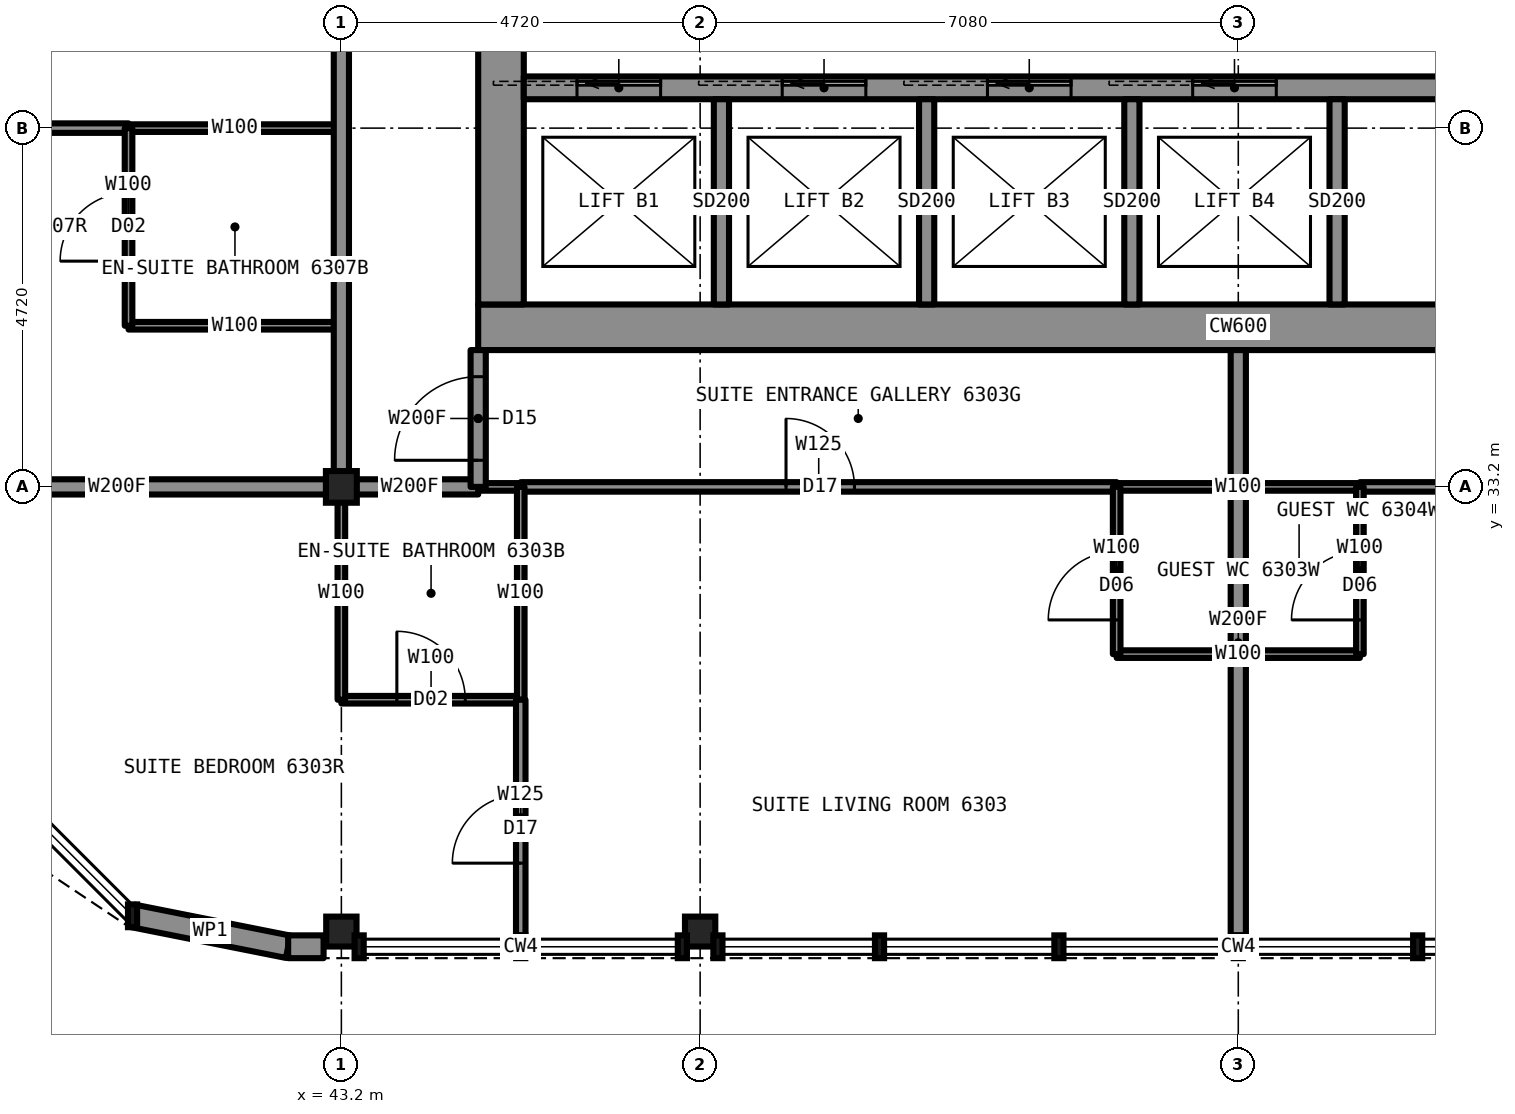
"""IFC4 building model, lengths in metres.
Left out: names, types, materials, properties, quantities, classifications, styles, units other than length and angle.
Written with IfcOpenShell. Run it as: python <this file> out.ifc"""

import sys

from ifc_helpers import new_model, si_unit, direction, frame, frame_2d, origin, origin_2d, place, context, subcontext, project, spatial, rectangle, i_section, extrude, element, fill, save


model = new_model("IFC4")
c1 = context("Model", 3, precision=1e-05, world=origin(), true_north=direction((0.0, 1.0)))
c2 = subcontext(c1, "Body", "Model", "MODEL_VIEW")
j1 = project(units=[si_unit("LENGTHUNIT", "METRE"), si_unit("PLANEANGLEUNIT", "RADIAN")], contexts=[c1])
p1 = place(None, origin())
s1 = spatial("IfcSite", under=j1, at=p1, CompositionType="ELEMENT")
p2 = place(p1, origin())
s2 = spatial("IfcBuilding", under=s1, at=p2, CompositionType="ELEMENT")
p3 = place(p2, frame((0.0, 0.0, 226.7)))
s3 = spatial("IfcBuildingStorey", under=s2, at=p3, CompositionType="ELEMENT", Elevation=226.7)
for number, where, z_axis, x_axis in (
    (1, (43.2, 27.35, 0.0), (0.0, 0.0, 1.0), (1.0, 0.0, 0.0)),
    (2, (47.92, 27.35, 0.0), (0.0, 0.0, 1.0), (1.0, 0.0, 0.0)),
):
    element("IfcColumn", number, at=place(p3, frame(where, z_axis=z_axis, x_axis=x_axis)), inside=s3, PredefinedType="COLUMN", context=c2, shape_type="SweptSolid", body=[
        extrude(i_section(OverallWidth=0.442, OverallDepth=0.531, WebThickness=0.066, FlangeThickness=0.106, at=origin_2d()), origin(), (0.0, 0.0, 1.0), 3.5),
    ])
p4 = place(p3, frame((43.2, 33.2, 0.0), z_axis=(0.0, 0.0, 1.0), x_axis=(1.0, 0.0, 0.0)))
e3 = element("IfcColumn", 3, at=p4, inside=s3, PredefinedType="COLUMN", context=c2, shape_type="SweptSolid", body=[
    extrude(i_section(OverallWidth=0.406, OverallDepth=0.417, WebThickness=0.03, FlangeThickness=0.048, at=origin_2d()), origin(), (0.0, 0.0, 1.0), 3.5),
])
p5 = place(p3, frame((45.0, 35.3, 0.0), z_axis=(0.0, 0.0, 1.0), x_axis=(1.0, 0.0, 0.0)))
e4 = element("IfcWall", 4, at=p5, inside=s3, PredefinedType="SHEAR", context=c2, shape_type="SweptSolid", body=[
    extrude(rectangle(XDim=20.0, YDim=0.6, at=frame_2d((10.0, 0.0))), origin(), (0.0, 0.0, 1.0), 3.5),
])
p6 = place(p3, frame((45.3, 35.6, 0.0), z_axis=(0.0, 0.0, 1.0), x_axis=(0.0, 1.0, 0.0)))
e5 = element("IfcWall", 5, at=p6, inside=s3, PredefinedType="SHEAR", context=c2, shape_type="SweptSolid", body=[
    extrude(rectangle(XDim=18.8, YDim=0.6, at=frame_2d((9.4, 0.0))), origin(), (0.0, 0.0, 1.0), 3.5),
])
p7 = place(p6, frame((13.4, 0.0, 0.0)))
e6 = element("IfcOpeningElement", 6, at=p7, cuts=e5, PredefinedType="OPENING", context=c2, shape_type="SweptSolid", body=[
    extrude(rectangle(XDim=1.8, YDim=2.2, at=frame_2d((0.9, 1.1))), frame((0.0, 0.31, 0.0), z_axis=(0.0, -1.0, 0.0), x_axis=(1.0, 0.0, 0.0)), (0.0, 0.0, 1.0), 0.62),
])
p8 = place(p6, frame((3.6, 0.0, 0.0)))
e7 = element("IfcOpeningElement", 7, at=p8, cuts=e5, PredefinedType="OPENING", context=c2, shape_type="SweptSolid", body=[
    extrude(rectangle(XDim=1.8, YDim=2.2, at=frame_2d((0.9, 1.1))), frame((0.0, 0.31, 0.0), z_axis=(0.0, -1.0, 0.0), x_axis=(1.0, 0.0, 0.0)), (0.0, 0.0, 1.0), 0.62),
])
p9 = place(p6, frame((6.4, 0.0, 0.0)))
e8 = element("IfcOpeningElement", 8, at=p9, cuts=e5, PredefinedType="OPENING", context=c2, shape_type="SweptSolid", body=[
    extrude(rectangle(XDim=1.2, YDim=2.2, at=frame_2d((0.6, 1.1))), frame((0.0, 0.31, 0.0), z_axis=(0.0, -1.0, 0.0), x_axis=(1.0, 0.0, 0.0)), (0.0, 0.0, 1.0), 0.62),
])
p10 = place(p3, frame((45.6, 38.45, 0.0), z_axis=(0.0, 0.0, 1.0), x_axis=(1.0, 0.0, 0.0)))
e9 = element("IfcWall", 9, at=p10, inside=s3, PredefinedType="SHEAR", context=c2, shape_type="SweptSolid", body=[
    extrude(rectangle(XDim=18.8, YDim=0.3, at=frame_2d((9.4, 0.0))), origin(), (0.0, 0.0, 1.0), 3.5),
])
p11 = place(p10, frame((0.7, 0.0, 0.0)))
e10 = element("IfcOpeningElement", 10, at=p11, cuts=e9, PredefinedType="OPENING", context=c2, shape_type="SweptSolid", body=[
    extrude(rectangle(XDim=1.1, YDim=2.2, at=frame_2d((0.55, 1.1))), frame((0.0, 0.16, 0.0), z_axis=(0.0, -1.0, 0.0), x_axis=(1.0, 0.0, 0.0)), (0.0, 0.0, 1.0), 0.32),
])
p12 = place(p10, frame((3.4, 0.0, 0.0)))
e11 = element("IfcOpeningElement", 11, at=p12, cuts=e9, PredefinedType="OPENING", context=c2, shape_type="SweptSolid", body=[
    extrude(rectangle(XDim=1.1, YDim=2.2, at=frame_2d((0.55, 1.1))), frame((0.0, 0.16, 0.0), z_axis=(0.0, -1.0, 0.0), x_axis=(1.0, 0.0, 0.0)), (0.0, 0.0, 1.0), 0.32),
])
p13 = place(p10, frame((6.1, 0.0, 0.0)))
e12 = element("IfcOpeningElement", 12, at=p13, cuts=e9, PredefinedType="OPENING", context=c2, shape_type="SweptSolid", body=[
    extrude(rectangle(XDim=1.1, YDim=2.2, at=frame_2d((0.55, 1.1))), frame((0.0, 0.16, 0.0), z_axis=(0.0, -1.0, 0.0), x_axis=(1.0, 0.0, 0.0)), (0.0, 0.0, 1.0), 0.32),
])
p14 = place(p10, frame((8.8, 0.0, 0.0)))
e13 = element("IfcOpeningElement", 13, at=p14, cuts=e9, PredefinedType="OPENING", context=c2, shape_type="SweptSolid", body=[
    extrude(rectangle(XDim=1.1, YDim=2.2, at=frame_2d((0.55, 1.1))), frame((0.0, 0.16, 0.0), z_axis=(0.0, -1.0, 0.0), x_axis=(1.0, 0.0, 0.0)), (0.0, 0.0, 1.0), 0.32),
])
p15 = place(p3, frame((45.0, 33.2, 0.0), z_axis=(0.0, 0.0, 1.0), x_axis=(1.0, 0.0, 0.0)))
e14 = element("IfcWall", 14, at=p15, inside=s3, PredefinedType="PARTITIONING", context=c2, shape_type="SweptSolid", body=[
    extrude(rectangle(XDim=0.56, YDim=0.1, at=frame_2d((0.28, 0.0))), origin(), (0.0, 0.0, 1.0), 3.33),
])
p16 = place(p3, frame((53.4, 33.2, 0.0), z_axis=(0.0, 0.0, 1.0), x_axis=(1.0, 0.0, 0.0)))
e15 = element("IfcWall", 15, at=p16, inside=s3, PredefinedType="PARTITIONING", context=c2, shape_type="SweptSolid", body=[
    extrude(rectangle(XDim=3.2, YDim=0.1, at=frame_2d((1.6, 0.0))), origin(), (0.0, 0.0, 1.0), 3.33),
])
p17 = place(p3, frame((43.2, 33.2, 0.0), z_axis=(0.0, 0.0, 1.0), x_axis=(1.0, 0.0, 0.0)))
e16 = element("IfcWall", 16, at=p17, inside=s3, PredefinedType="PARTITIONING", context=c2, shape_type="SweptSolid", body=[
    extrude(rectangle(XDim=1.8, YDim=0.2, at=frame_2d((0.9, 0.0))), origin(), (0.0, 0.0, 1.0), 3.33),
])
p18 = place(p3, frame((37.3, 33.2, 0.0), z_axis=(0.0, 0.0, 1.0), x_axis=(1.0, 0.0, 0.0)))
e17 = element("IfcWall", 17, at=p18, inside=s3, PredefinedType="PARTITIONING", context=c2, shape_type="SweptSolid", body=[
    extrude(rectangle(XDim=5.9, YDim=0.2, at=frame_2d((2.95, 0.0))), origin(), (0.0, 0.0, 1.0), 2.573),
])
p19 = place(p3, frame((45.56, 33.2, 0.0), z_axis=(0.0, 0.0, 1.0), x_axis=(1.0, 0.0, 0.0)))
e18 = element("IfcWall", 18, at=p19, inside=s3, PredefinedType="PARTITIONING", context=c2, shape_type="SweptSolid", body=[
    extrude(rectangle(XDim=7.84, YDim=0.125, at=frame_2d((3.92, 0.0))), origin(), (0.0, 0.0, 1.0), 3.33),
])
p20 = place(p19, frame((3.49, 0.0, 0.0)))
e19 = element("IfcOpeningElement", 19, at=p20, cuts=e18, PredefinedType="OPENING", context=c2, shape_type="SweptSolid", body=[
    extrude(rectangle(XDim=0.9, YDim=2.2, at=frame_2d((0.45, 1.1))), frame((0.0, 0.073, 0.0), z_axis=(0.0, -1.0, 0.0), x_axis=(1.0, 0.0, 0.0)), (0.0, 0.0, 1.0), 0.145),
])
p21 = place(p3, frame((56.6, 33.2, 0.0), z_axis=(0.0, 0.0, 1.0), x_axis=(1.0, 0.0, 0.0)))
e20 = element("IfcWall", 20, at=p21, inside=s3, PredefinedType="PARTITIONING", context=c2, shape_type="SweptSolid", body=[
    extrude(rectangle(XDim=7.84, YDim=0.125, at=frame_2d((3.92, 0.0))), origin(), (0.0, 0.0, 1.0), 3.33),
])
p22 = place(p21, frame((3.45, 0.0, 0.0)))
e21 = element("IfcOpeningElement", 21, at=p22, cuts=e20, PredefinedType="OPENING", context=c2, shape_type="SweptSolid", body=[
    extrude(rectangle(XDim=0.9, YDim=2.2, at=frame_2d((0.45, 1.1))), frame((0.0, 0.073, 0.0), z_axis=(0.0, -1.0, 0.0), x_axis=(1.0, 0.0, 0.0)), (0.0, 0.0, 1.0), 0.145),
])
p23 = place(p3, frame((53.4, 31.0, 0.0), z_axis=(0.0, 0.0, 1.0), x_axis=(1.0, 0.0, 0.0)))
e22 = element("IfcWall", 22, at=p23, inside=s3, PredefinedType="PARTITIONING", context=c2, shape_type="SweptSolid", body=[
    extrude(rectangle(XDim=3.2, YDim=0.1, at=frame_2d((1.6, 0.0))), origin(), (0.0, 0.0, 1.0), 3.33),
])
p24 = place(p3, frame((43.2, 30.4, 0.0), z_axis=(0.0, 0.0, 1.0), x_axis=(1.0, 0.0, 0.0)))
e23 = element("IfcWall", 23, at=p24, inside=s3, PredefinedType="PARTITIONING", context=c2, shape_type="SweptSolid", body=[
    extrude(rectangle(XDim=2.36, YDim=0.1, at=frame_2d((1.18, 0.0))), origin(), (0.0, 0.0, 1.0), 3.33),
])
p25 = place(p24, frame((0.73, 0.0, 0.0)))
e24 = element("IfcOpeningElement", 24, at=p25, cuts=e23, PredefinedType="OPENING", context=c2, shape_type="SweptSolid", body=[
    extrude(rectangle(XDim=0.9, YDim=2.1, at=frame_2d((0.45, 1.05))), frame((0.0, 0.06, 0.0), z_axis=(0.0, -1.0, 0.0), x_axis=(1.0, 0.0, 0.0)), (0.0, 0.0, 1.0), 0.12),
])
p26 = place(p3, frame((40.4, 37.92, 0.0), z_axis=(0.0, 0.0, 1.0), x_axis=(1.0, 0.0, 0.0)))
e25 = element("IfcWall", 25, at=p26, inside=s3, PredefinedType="PARTITIONING", context=c2, shape_type="SweptSolid", body=[
    extrude(rectangle(XDim=2.8, YDim=0.1, at=frame_2d((1.4, 0.0))), origin(), (0.0, 0.0, 1.0), 2.573),
])
p27 = place(p3, frame((37.3, 37.92, 0.0), z_axis=(0.0, 0.0, 1.0), x_axis=(1.0, 0.0, 0.0)))
e26 = element("IfcWall", 26, at=p27, inside=s3, PredefinedType="PARTITIONING", context=c2, shape_type="SweptSolid", body=[
    extrude(rectangle(XDim=3.1, YDim=0.125, at=frame_2d((1.55, 0.0))), origin(), (0.0, 0.0, 1.0), 2.573),
])
p28 = place(p27, frame((0.95, 0.0, 0.0)))
e27 = element("IfcOpeningElement", 27, at=p28, cuts=e26, PredefinedType="OPENING", context=c2, shape_type="SweptSolid", body=[
    extrude(rectangle(XDim=0.9, YDim=2.2, at=frame_2d((0.45, 1.1))), frame((0.0, 0.073, 0.0), z_axis=(0.0, -1.0, 0.0), x_axis=(1.0, 0.0, 0.0)), (0.0, 0.0, 1.0), 0.145),
])
p29 = place(p3, frame((40.4, 35.32, 0.0), z_axis=(0.0, 0.0, 1.0), x_axis=(1.0, 0.0, 0.0)))
e28 = element("IfcWall", 28, at=p29, inside=s3, PredefinedType="PARTITIONING", context=c2, shape_type="SweptSolid", body=[
    extrude(rectangle(XDim=2.8, YDim=0.1, at=frame_2d((1.4, 0.0))), origin(), (0.0, 0.0, 1.0), 3.33),
])
p30 = place(p3, frame((53.4, 31.0, 0.0), z_axis=(0.0, 0.0, 1.0), x_axis=(0.0, 1.0, 0.0)))
e29 = element("IfcWall", 29, at=p30, inside=s3, PredefinedType="PARTITIONING", context=c2, shape_type="SweptSolid", body=[
    extrude(rectangle(XDim=2.2, YDim=0.1, at=frame_2d((1.1, 0.0))), origin(), (0.0, 0.0, 1.0), 3.33),
])
p31 = place(p30, frame((0.45, 0.0, 0.0)))
e30 = element("IfcOpeningElement", 30, at=p31, cuts=e29, PredefinedType="OPENING", context=c2, shape_type="SweptSolid", body=[
    extrude(rectangle(XDim=0.9, YDim=2.1, at=frame_2d((0.45, 1.05))), frame((0.0, 0.06, 0.0), z_axis=(0.0, -1.0, 0.0), x_axis=(1.0, 0.0, 0.0)), (0.0, 0.0, 1.0), 0.12),
])
p32 = place(p3, frame((45.0, 33.2, 0.0), z_axis=(0.0, 0.0, 1.0), x_axis=(0.0, 1.0, 0.0)))
e31 = element("IfcWall", 31, at=p32, inside=s3, PredefinedType="PARTITIONING", context=c2, shape_type="SweptSolid", body=[
    extrude(rectangle(XDim=1.8, YDim=0.2, at=frame_2d((0.9, 0.0))), origin(), (0.0, 0.0, 1.0), 3.33),
])
p33 = place(p32, frame((0.35, 0.0, 0.0)))
e32 = element("IfcOpeningElement", 32, at=p33, cuts=e31, PredefinedType="OPENING", context=c2, shape_type="SweptSolid", body=[
    extrude(rectangle(XDim=1.1, YDim=2.2, at=frame_2d((0.55, 1.1))), frame((0.0, 0.11, 0.0), z_axis=(0.0, -1.0, 0.0), x_axis=(1.0, 0.0, 0.0)), (0.0, 0.0, 1.0), 0.22),
])
p34 = place(p3, frame((43.2, 30.4, 0.0), z_axis=(0.0, 0.0, 1.0), x_axis=(0.0, 1.0, 0.0)))
e33 = element("IfcWall", 33, at=p34, inside=s3, PredefinedType="PARTITIONING", context=c2, shape_type="SweptSolid", body=[
    extrude(rectangle(XDim=2.8, YDim=0.1, at=frame_2d((1.4, 0.0))), origin(), (0.0, 0.0, 1.0), 2.573),
])
p35 = place(p3, frame((43.2, 33.2, 0.0), z_axis=(0.0, 0.0, 1.0), x_axis=(0.0, 1.0, 0.0)))
e34 = element("IfcWall", 34, at=p35, inside=s3, PredefinedType="PARTITIONING", context=c2, shape_type="SweptSolid", body=[
    extrude(rectangle(XDim=23.6, YDim=0.2, at=frame_2d((11.8, 0.0))), origin(), (0.0, 0.0, 1.0), 3.33),
])
p36 = place(p35, frame((8.85, 0.0, 0.0)))
e35 = element("IfcOpeningElement", 35, at=p36, cuts=e34, PredefinedType="OPENING", context=c2, shape_type="SweptSolid", body=[
    extrude(rectangle(XDim=1.1, YDim=2.2, at=frame_2d((0.55, 1.1))), frame((0.0, 0.11, 0.0), z_axis=(0.0, -1.0, 0.0), x_axis=(1.0, 0.0, 0.0)), (0.0, 0.0, 1.0), 0.22),
])
p37 = place(p35, frame((13.65, 0.0, 0.0)))
e36 = element("IfcOpeningElement", 36, at=p37, cuts=e34, PredefinedType="OPENING", context=c2, shape_type="SweptSolid", body=[
    extrude(rectangle(XDim=1.1, YDim=2.2, at=frame_2d((0.55, 1.1))), frame((0.0, 0.11, 0.0), z_axis=(0.0, -1.0, 0.0), x_axis=(1.0, 0.0, 0.0)), (0.0, 0.0, 1.0), 0.22),
])
p38 = place(p3, frame((40.4, 35.32, 0.0), z_axis=(0.0, 0.0, 1.0), x_axis=(0.0, 1.0, 0.0)))
e37 = element("IfcWall", 37, at=p38, inside=s3, PredefinedType="PARTITIONING", context=c2, shape_type="SweptSolid", body=[
    extrude(rectangle(XDim=2.6, YDim=0.1, at=frame_2d((1.3, 0.0))), origin(), (0.0, 0.0, 1.0), 3.33),
])
p39 = place(p38, frame((0.85, 0.0, 0.0)))
e38 = element("IfcOpeningElement", 38, at=p39, cuts=e37, PredefinedType="OPENING", context=c2, shape_type="SweptSolid", body=[
    extrude(rectangle(XDim=0.9, YDim=2.1, at=frame_2d((0.45, 1.05))), frame((0.0, 0.06, 0.0), z_axis=(0.0, -1.0, 0.0), x_axis=(1.0, 0.0, 0.0)), (0.0, 0.0, 1.0), 0.12),
])
p40 = place(p3, frame((45.56, 30.4, 0.0), z_axis=(0.0, 0.0, 1.0), x_axis=(0.0, 1.0, 0.0)))
e39 = element("IfcWall", 39, at=p40, inside=s3, PredefinedType="PARTITIONING", context=c2, shape_type="SweptSolid", body=[
    extrude(rectangle(XDim=2.8, YDim=0.1, at=frame_2d((1.4, 0.0))), origin(), (0.0, 0.0, 1.0), 3.33),
])
p41 = place(p3, frame((45.56, 27.3, 0.0), z_axis=(0.0, 0.0, 1.0), x_axis=(0.0, 1.0, 0.0)))
e40 = element("IfcWall", 40, at=p41, inside=s3, PredefinedType="PARTITIONING", context=c2, shape_type="SweptSolid", body=[
    extrude(rectangle(XDim=3.1, YDim=0.125, at=frame_2d((1.55, 0.0))), origin(), (0.0, 0.0, 1.0), 3.33),
])
p42 = place(p41, frame((0.95, 0.0, 0.0)))
e41 = element("IfcOpeningElement", 41, at=p42, cuts=e40, PredefinedType="OPENING", context=c2, shape_type="SweptSolid", body=[
    extrude(rectangle(XDim=0.9, YDim=2.2, at=frame_2d((0.45, 1.1))), frame((0.0, 0.073, 0.0), z_axis=(0.0, -1.0, 0.0), x_axis=(1.0, 0.0, 0.0)), (0.0, 0.0, 1.0), 0.145),
])
p43 = place(p3, frame((55.0, 27.3, 0.0), z_axis=(0.0, 0.0, 1.0), x_axis=(0.0, 1.0, 0.0)))
e42 = element("IfcWall", 42, at=p43, inside=s3, PredefinedType="PARTITIONING", context=c2, shape_type="SweptSolid", body=[
    extrude(rectangle(XDim=7.7, YDim=0.2, at=frame_2d((3.85, 0.0))), origin(), (0.0, 0.0, 1.0), 2.573),
])
p44 = place(p3, frame((56.6, 31.0, 0.0), z_axis=(0.0, 0.0, 1.0), x_axis=(0.0, 1.0, 0.0)))
e43 = element("IfcWall", 43, at=p44, inside=s3, PredefinedType="PARTITIONING", context=c2, shape_type="SweptSolid", body=[
    extrude(rectangle(XDim=2.2, YDim=0.1, at=frame_2d((1.1, 0.0))), origin(), (0.0, 0.0, 1.0), 3.33),
])
p45 = place(p44, frame((0.45, 0.0, 0.0)))
e44 = element("IfcOpeningElement", 44, at=p45, cuts=e43, PredefinedType="OPENING", context=c2, shape_type="SweptSolid", body=[
    extrude(rectangle(XDim=0.9, YDim=2.1, at=frame_2d((0.45, 1.05))), frame((0.0, 0.06, 0.0), z_axis=(0.0, -1.0, 0.0), x_axis=(1.0, 0.0, 0.0)), (0.0, 0.0, 1.0), 0.12),
])
for number, where, z_axis, x_axis in (
    (45, (48.2, 35.6, 0.0), (0.0, 0.0, 1.0), (0.0, 1.0, 0.0)),
    (46, (50.9, 35.6, 0.0), (0.0, 0.0, 1.0), (0.0, 1.0, 0.0)),
    (47, (53.6, 35.6, 0.0), (0.0, 0.0, 1.0), (0.0, 1.0, 0.0)),
    (48, (56.3, 35.6, 0.0), (0.0, 0.0, 1.0), (0.0, 1.0, 0.0)),
):
    element("IfcWall", number, at=place(p3, frame(where, z_axis=z_axis, x_axis=x_axis)), inside=s3, PredefinedType="PARTITIONING", context=c2, shape_type="SweptSolid", body=[
        extrude(rectangle(XDim=2.7, YDim=0.2, at=frame_2d((1.35, 0.0))), origin(), (0.0, 0.0, 1.0), 3.33),
    ])
p46 = place(p3, frame((38.717, 28.717, 0.0), z_axis=(0.0, 0.0, 1.0), x_axis=(0.831420010345, -0.555644460423, 0.0)))
e49 = element("IfcWall", 49, at=p46, inside=s3, PredefinedType="SOLIDWALL", context=c2, shape_type="SweptSolid", body=[
    extrude(rectangle(XDim=2.087, YDim=0.3, at=frame_2d((1.044, 0.0))), origin(), (0.0, 0.0, 1.0), 2.83),
])
p47 = place(p20, origin())
e50 = element("IfcDoor", 50, at=p47, inside=s3, OperationType="SINGLE_SWING_LEFT", PredefinedType="DOOR", context=c2, shape_type="SweptSolid", body=[
    extrude(rectangle(XDim=0.9, YDim=2.2, at=frame_2d((0.45, 1.1))), frame((0.0, 0.025, 0.0), z_axis=(0.0, -1.0, 0.0), x_axis=(1.0, 0.0, 0.0)), (0.0, 0.0, 1.0), 0.05),
])
fill(e19, e50)
p48 = place(p25, origin())
e51 = element("IfcDoor", 51, at=p48, inside=s3, OperationType="SINGLE_SWING_RIGHT", PredefinedType="DOOR", context=c2, shape_type="SweptSolid", body=[
    extrude(rectangle(XDim=0.9, YDim=2.1, at=frame_2d((0.45, 1.05))), frame((0.0, 0.025, 0.0), z_axis=(0.0, -1.0, 0.0), x_axis=(1.0, 0.0, 0.0)), (0.0, 0.0, 1.0), 0.05),
])
fill(e24, e51)
p49 = place(p33, origin())
e52 = element("IfcDoor", 52, at=p49, inside=s3, OperationType="SINGLE_SWING_LEFT", PredefinedType="DOOR", context=c2, shape_type="SweptSolid", body=[
    extrude(rectangle(XDim=1.1, YDim=2.2, at=frame_2d((0.55, 1.1))), frame((0.0, 0.025, 0.0), z_axis=(0.0, -1.0, 0.0), x_axis=(1.0, 0.0, 0.0)), (0.0, 0.0, 1.0), 0.05),
])
fill(e32, e52)
p50 = place(p42, origin())
e53 = element("IfcDoor", 53, at=p50, inside=s3, OperationType="SINGLE_SWING_LEFT", PredefinedType="DOOR", context=c2, shape_type="SweptSolid", body=[
    extrude(rectangle(XDim=0.9, YDim=2.2, at=frame_2d((0.45, 1.1))), frame((0.0, 0.025, 0.0), z_axis=(0.0, -1.0, 0.0), x_axis=(1.0, 0.0, 0.0)), (0.0, 0.0, 1.0), 0.05),
])
fill(e41, e53)
p51 = place(p31, origin())
e54 = element("IfcDoor", 54, at=p51, inside=s3, OperationType="SINGLE_SWING_LEFT", PredefinedType="DOOR", context=c2, shape_type="SweptSolid", body=[
    extrude(rectangle(XDim=0.9, YDim=2.1, at=frame_2d((0.45, 1.05))), frame((0.0, 0.025, 0.0), z_axis=(0.0, -1.0, 0.0), x_axis=(1.0, 0.0, 0.0)), (0.0, 0.0, 1.0), 0.05),
])
fill(e30, e54)
p52 = place(p45, origin())
e55 = element("IfcDoor", 55, at=p52, inside=s3, OperationType="SINGLE_SWING_LEFT", PredefinedType="DOOR", context=c2, shape_type="SweptSolid", body=[
    extrude(rectangle(XDim=0.9, YDim=2.1, at=frame_2d((0.45, 1.05))), frame((0.0, 0.025, 0.0), z_axis=(0.0, -1.0, 0.0), x_axis=(1.0, 0.0, 0.0)), (0.0, 0.0, 1.0), 0.05),
])
fill(e44, e55)
p53 = place(p39, origin())
e56 = element("IfcDoor", 56, at=p53, inside=s3, OperationType="SINGLE_SWING_RIGHT", PredefinedType="DOOR", context=c2, shape_type="SweptSolid", body=[
    extrude(rectangle(XDim=0.9, YDim=2.1, at=frame_2d((0.45, 1.05))), frame((0.0, 0.025, 0.0), z_axis=(0.0, -1.0, 0.0), x_axis=(1.0, 0.0, 0.0)), (0.0, 0.0, 1.0), 0.05),
])
fill(e38, e56)
p54 = place(p11, origin())
e57 = element("IfcDoor", 57, at=p54, inside=s3, OperationType="SLIDING_TO_LEFT", PredefinedType="DOOR", context=c2, shape_type="SweptSolid", body=[
    extrude(rectangle(XDim=1.1, YDim=2.2, at=frame_2d((0.55, 1.1))), frame((0.0, 0.025, 0.0), z_axis=(0.0, -1.0, 0.0), x_axis=(1.0, 0.0, 0.0)), (0.0, 0.0, 1.0), 0.05),
])
fill(e10, e57)
p55 = place(p12, origin())
e58 = element("IfcDoor", 58, at=p55, inside=s3, OperationType="SLIDING_TO_LEFT", PredefinedType="DOOR", context=c2, shape_type="SweptSolid", body=[
    extrude(rectangle(XDim=1.1, YDim=2.2, at=frame_2d((0.55, 1.1))), frame((0.0, 0.025, 0.0), z_axis=(0.0, -1.0, 0.0), x_axis=(1.0, 0.0, 0.0)), (0.0, 0.0, 1.0), 0.05),
])
fill(e11, e58)
p56 = place(p13, origin())
e59 = element("IfcDoor", 59, at=p56, inside=s3, OperationType="SLIDING_TO_LEFT", PredefinedType="DOOR", context=c2, shape_type="SweptSolid", body=[
    extrude(rectangle(XDim=1.1, YDim=2.2, at=frame_2d((0.55, 1.1))), frame((0.0, 0.025, 0.0), z_axis=(0.0, -1.0, 0.0), x_axis=(1.0, 0.0, 0.0)), (0.0, 0.0, 1.0), 0.05),
])
fill(e12, e59)
p57 = place(p14, origin())
e60 = element("IfcDoor", 60, at=p57, inside=s3, OperationType="SLIDING_TO_LEFT", PredefinedType="DOOR", context=c2, shape_type="SweptSolid", body=[
    extrude(rectangle(XDim=1.1, YDim=2.2, at=frame_2d((0.55, 1.1))), frame((0.0, 0.025, 0.0), z_axis=(0.0, -1.0, 0.0), x_axis=(1.0, 0.0, 0.0)), (0.0, 0.0, 1.0), 0.05),
])
fill(e13, e60)
save(model, sys.argv[1])
